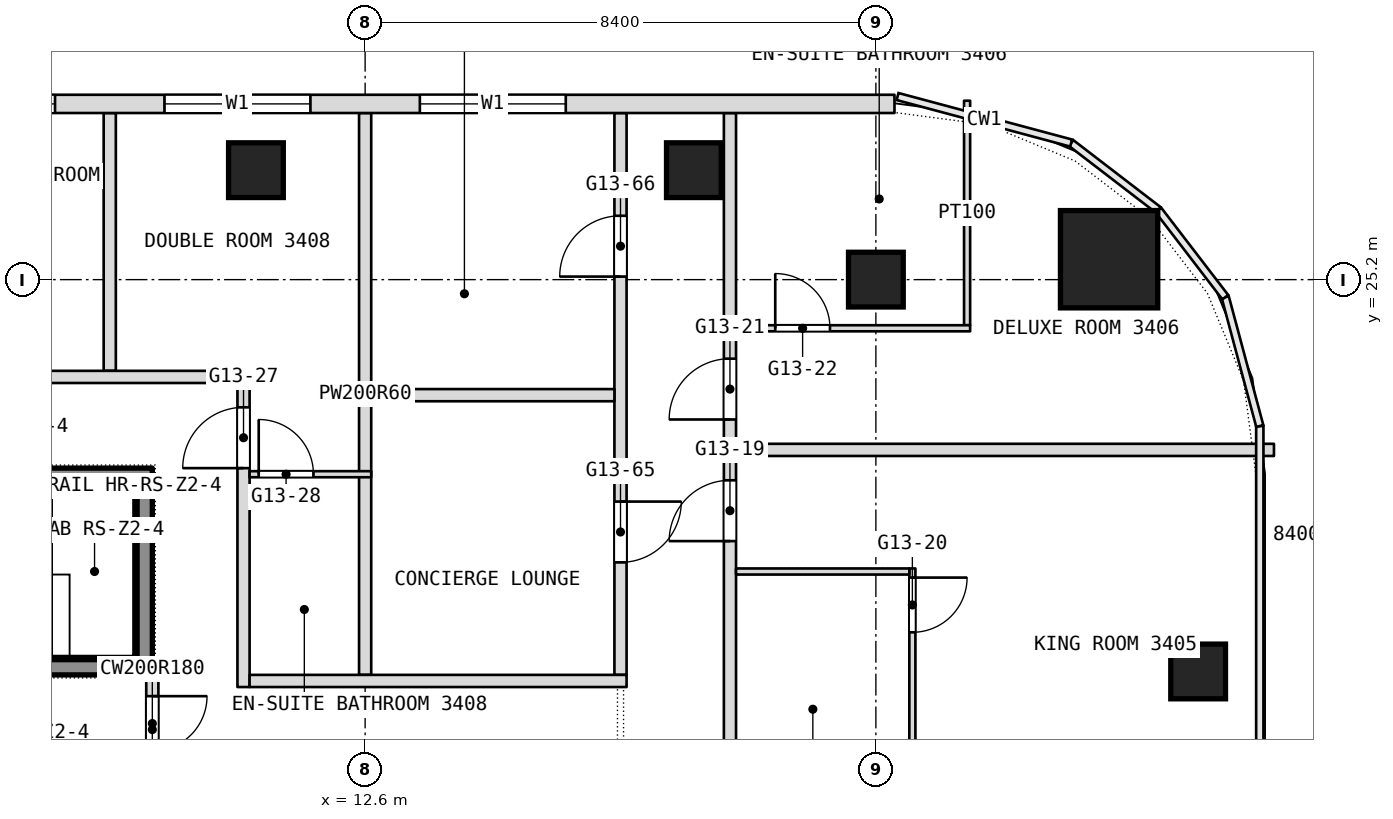
"""IFC4 building model, lengths in metres.
Left out: names, types, materials, properties, quantities, classifications, styles, units other than length and angle.
Written with IfcOpenShell. Run it as: python <this file> out.ifc"""

import sys

from ifc_helpers import new_model, si_unit, direction, frame, frame_2d, origin, origin_2d, place, context, subcontext, project, spatial, rectangle, extrude, element, fill, save


model = new_model("IFC4")
c1 = context("Model", 3, precision=1e-05, world=origin(), true_north=direction((0.0, 1.0)))
c2 = subcontext(c1, "Body", "Model", "MODEL_VIEW")
j1 = project(units=[si_unit("LENGTHUNIT", "METRE"), si_unit("PLANEANGLEUNIT", "RADIAN")], contexts=[c1])
p1 = place(None, origin())
s1 = spatial("IfcSite", under=j1, at=p1, CompositionType="ELEMENT")
p2 = place(p1, origin())
s2 = spatial("IfcBuilding", under=s1, at=p2, CompositionType="ELEMENT")
p3 = place(p2, frame((0.0, 0.0, 148.1)))
s3 = spatial("IfcBuildingStorey", under=s2, at=p3, CompositionType="ELEMENT", Elevation=148.1)
p4 = place(p3, frame((24.835, 25.535, 0.0), z_axis=(0.0, 0.0, 1.0), x_axis=(1.0, 0.0, 0.0)))
e1 = element("IfcColumn", 1, at=p4, inside=s3, PredefinedType="COLUMN", context=c2, shape_type="SweptSolid", body=[
    extrude(rectangle(XDim=1.6, YDim=1.6, at=origin_2d()), origin(), (0.0, 0.0, 1.0), 3.6),
])
for number, where, z_axis, x_axis in (
    (2, (21.0, 25.2, 0.0), (0.0, 0.0, 1.0), (1.0, 0.0, 0.0)),
    (3, (10.804, 27.0, 0.0), (0.0, 0.0, 1.0), (1.0, 0.0, 0.0)),
    (4, (18.007, 27.0, 0.0), (0.0, 0.0, 1.0), (1.0, 0.0, 0.0)),
    (5, (26.3, 18.756, 0.0), (0.0, 0.0, 1.0), (1.0, 0.0, 0.0)),
):
    element("IfcColumn", number, at=place(p3, frame(where, z_axis=z_axis, x_axis=x_axis)), inside=s3, PredefinedType="COLUMN", context=c2, shape_type="SweptSolid", body=[
        extrude(rectangle(XDim=0.9, YDim=0.9, at=origin_2d()), origin(), (0.0, 0.0, 1.0), 3.6),
    ])
p5 = place(p3, frame((22.5, 24.45, 0.0), z_axis=(0.0, 0.0, 1.0), x_axis=(0.0, 1.0, 0.0)))
e6 = element("IfcWall", 6, at=p5, inside=s3, PredefinedType="PARTITIONING", context=c2, shape_type="SweptSolid", body=[
    extrude(rectangle(XDim=3.692, YDim=0.1, at=frame_2d((1.846, 0.0))), origin(), (0.0, 0.0, 1.0), 3.34),
])
p6 = place(p3, frame((21.6, 16.9, 0.0), z_axis=(0.0, 0.0, 1.0), x_axis=(0.0, 1.0, 0.0)))
e7 = element("IfcWall", 7, at=p6, inside=s3, PredefinedType="PARTITIONING", context=c2, shape_type="SweptSolid", body=[
    extrude(rectangle(XDim=3.55, YDim=0.1, at=frame_2d((1.775, 0.0))), origin(), (0.0, 0.0, 1.0), 3.34),
])
p7 = place(p6, frame((2.5, 0.0, 0.0)))
e8 = element("IfcOpeningElement", 8, at=p7, cuts=e7, PredefinedType="OPENING", context=c2, shape_type="SweptSolid", body=[
    extrude(rectangle(XDim=0.9, YDim=2.1, at=frame_2d((0.45, 1.05))), frame((0.0, 0.05, 0.0), z_axis=(0.0, -1.0, 0.0), x_axis=(1.0, 0.0, 0.0)), (0.0, 0.0, 1.0), 0.1),
])
p8 = place(p3, frame((18.6, -21.708, 0.0), z_axis=(0.0, 0.0, 1.0), x_axis=(0.0, 1.0, 0.0)))
e9 = element("IfcWall", 9, at=p8, inside=s3, PredefinedType="PARTITIONING", context=c2, shape_type="SweptSolid", body=[
    extrude(rectangle(XDim=49.648, YDim=0.2, at=frame_2d((24.824, 0.0))), origin(), (0.0, 0.0, 1.0), 3.34),
])
p9 = place(p8, frame((2.8, 0.0, 0.0)))
e10 = element("IfcOpeningElement", 10, at=p9, cuts=e9, PredefinedType="OPENING", context=c2, shape_type="SweptSolid", body=[
    extrude(rectangle(XDim=1.0, YDim=2.1, at=frame_2d((0.5, 1.05))), frame((0.0, 0.1, 0.0), z_axis=(0.0, -1.0, 0.0), x_axis=(1.0, 0.0, 0.0)), (0.0, 0.0, 1.0), 0.2),
])
p10 = place(p8, frame((10.658, 0.0, 0.0)))
e11 = element("IfcOpeningElement", 11, at=p10, cuts=e9, PredefinedType="OPENING", context=c2, shape_type="SweptSolid", body=[
    extrude(rectangle(XDim=1.1, YDim=2.1, at=frame_2d((0.55, 1.05))), frame((0.0, 0.1, 0.0), z_axis=(0.0, -1.0, 0.0), x_axis=(1.0, 0.0, 0.0)), (0.0, 0.0, 1.0), 0.2),
])
p11 = place(p8, frame((16.608, 0.0, 0.0)))
e12 = element("IfcOpeningElement", 12, at=p11, cuts=e9, PredefinedType="OPENING", context=c2, shape_type="SweptSolid", body=[
    extrude(rectangle(XDim=1.8, YDim=2.1, at=frame_2d((0.9, 1.05))), frame((0.0, 0.1, 0.0), z_axis=(0.0, -1.0, 0.0), x_axis=(1.0, 0.0, 0.0)), (0.0, 0.0, 1.0), 0.2),
])
p12 = place(p8, frame((24.508, 0.0, 0.0)))
e13 = element("IfcOpeningElement", 13, at=p12, cuts=e9, PredefinedType="OPENING", context=c2, shape_type="SweptSolid", body=[
    extrude(rectangle(XDim=1.0, YDim=2.1, at=frame_2d((0.5, 1.05))), frame((0.0, 0.1, 0.0), z_axis=(0.0, -1.0, 0.0), x_axis=(1.0, 0.0, 0.0)), (0.0, 0.0, 1.0), 0.2),
])
p13 = place(p8, frame((26.308, 0.0, 0.0)))
e14 = element("IfcOpeningElement", 14, at=p13, cuts=e9, PredefinedType="OPENING", context=c2, shape_type="SweptSolid", body=[
    extrude(rectangle(XDim=1.0, YDim=2.1, at=frame_2d((0.5, 1.05))), frame((0.0, 0.1, 0.0), z_axis=(0.0, -1.0, 0.0), x_axis=(1.0, 0.0, 0.0)), (0.0, 0.0, 1.0), 0.2),
])
p14 = place(p8, frame((33.408, 0.0, 0.0)))
e15 = element("IfcOpeningElement", 15, at=p14, cuts=e9, PredefinedType="OPENING", context=c2, shape_type="SweptSolid", body=[
    extrude(rectangle(XDim=1.8, YDim=2.1, at=frame_2d((0.9, 1.05))), frame((0.0, 0.1, 0.0), z_axis=(0.0, -1.0, 0.0), x_axis=(1.0, 0.0, 0.0)), (0.0, 0.0, 1.0), 0.2),
])
p15 = place(p8, frame((42.608, 0.0, 0.0)))
e16 = element("IfcOpeningElement", 16, at=p15, cuts=e9, PredefinedType="OPENING", context=c2, shape_type="SweptSolid", body=[
    extrude(rectangle(XDim=1.0, YDim=2.1, at=frame_2d((0.5, 1.05))), frame((0.0, 0.1, 0.0), z_axis=(0.0, -1.0, 0.0), x_axis=(1.0, 0.0, 0.0)), (0.0, 0.0, 1.0), 0.2),
])
p16 = place(p8, frame((44.608, 0.0, 0.0)))
e17 = element("IfcOpeningElement", 17, at=p16, cuts=e9, PredefinedType="OPENING", context=c2, shape_type="SweptSolid", body=[
    extrude(rectangle(XDim=1.0, YDim=2.1, at=frame_2d((0.5, 1.05))), frame((0.0, 0.1, 0.0), z_axis=(0.0, -1.0, 0.0), x_axis=(1.0, 0.0, 0.0)), (0.0, 0.0, 1.0), 0.2),
])
p17 = place(p3, frame((16.8, 18.7, 0.0), z_axis=(0.0, 0.0, 1.0), x_axis=(0.0, 1.0, 0.0)))
e18 = element("IfcWall", 18, at=p17, inside=s3, PredefinedType="PARTITIONING", context=c2, shape_type="SweptSolid", body=[
    extrude(rectangle(XDim=9.24, YDim=0.2, at=frame_2d((4.62, 0.0))), origin(), (0.0, 0.0, 1.0), 3.34),
])
p18 = place(p17, frame((1.85, 0.0, 0.0)))
e19 = element("IfcOpeningElement", 19, at=p18, cuts=e18, PredefinedType="OPENING", context=c2, shape_type="SweptSolid", body=[
    extrude(rectangle(XDim=1.0, YDim=2.1, at=frame_2d((0.5, 1.05))), frame((0.0, 0.1, 0.0), z_axis=(0.0, -1.0, 0.0), x_axis=(1.0, 0.0, 0.0)), (0.0, 0.0, 1.0), 0.2),
])
p19 = place(p17, frame((6.55, 0.0, 0.0)))
e20 = element("IfcOpeningElement", 20, at=p19, cuts=e18, PredefinedType="OPENING", context=c2, shape_type="SweptSolid", body=[
    extrude(rectangle(XDim=1.0, YDim=2.1, at=frame_2d((0.5, 1.05))), frame((0.0, 0.1, 0.0), z_axis=(0.0, -1.0, 0.0), x_axis=(1.0, 0.0, 0.0)), (0.0, 0.0, 1.0), 0.2),
])
p20 = place(p3, frame((12.6, 18.7, 0.0), z_axis=(0.0, 0.0, 1.0), x_axis=(0.0, 1.0, 0.0)))
e21 = element("IfcWall", 21, at=p20, inside=s3, PredefinedType="PARTITIONING", context=c2, shape_type="SweptSolid", body=[
    extrude(rectangle(XDim=9.24, YDim=0.2, at=frame_2d((4.62, 0.0))), origin(), (0.0, 0.0, 1.0), 3.34),
])
p21 = place(p3, frame((10.6, 18.5, 0.0), z_axis=(0.0, 0.0, 1.0), x_axis=(0.0, 1.0, 0.0)))
e22 = element("IfcWall", 22, at=p21, inside=s3, PredefinedType="PARTITIONING", context=c2, shape_type="SweptSolid", body=[
    extrude(rectangle(XDim=5.0, YDim=0.2, at=frame_2d((2.5, 0.0))), origin(), (0.0, 0.0, 1.0), 3.34),
])
p22 = place(p21, frame((3.6, 0.0, 0.0)))
e23 = element("IfcOpeningElement", 23, at=p22, cuts=e22, PredefinedType="OPENING", context=c2, shape_type="SweptSolid", body=[
    extrude(rectangle(XDim=1.0, YDim=2.1, at=frame_2d((0.5, 1.05))), frame((0.0, 0.1, 0.0), z_axis=(0.0, -1.0, 0.0), x_axis=(1.0, 0.0, 0.0)), (0.0, 0.0, 1.0), 0.2),
])
p23 = place(p3, frame((9.1, 16.9, 0.0), z_axis=(0.0, 0.0, 1.0), x_axis=(0.0, 1.0, 0.0)))
e24 = element("IfcWall", 24, at=p23, inside=s3, PredefinedType="PARTITIONING", context=c2, shape_type="SweptSolid", body=[
    extrude(rectangle(XDim=1.8, YDim=0.2, at=frame_2d((0.9, 0.0))), origin(), (0.0, 0.0, 1.0), 3.34),
])
p24 = place(p23, frame((0.55, 0.0, 0.0)))
e25 = element("IfcOpeningElement", 25, at=p24, cuts=e24, PredefinedType="OPENING", context=c2, shape_type="SweptSolid", body=[
    extrude(rectangle(XDim=0.9, YDim=2.1, at=frame_2d((0.45, 1.05))), frame((0.0, 0.1, 0.0), z_axis=(0.0, -1.0, 0.0), x_axis=(1.0, 0.0, 0.0)), (0.0, 0.0, 1.0), 0.2),
])
p25 = place(p3, frame((8.4, 23.7, 0.0), z_axis=(0.0, 0.0, 1.0), x_axis=(0.0, 1.0, 0.0)))
e26 = element("IfcWall", 26, at=p25, inside=s3, PredefinedType="PARTITIONING", context=c2, shape_type="SweptSolid", body=[
    extrude(rectangle(XDim=4.24, YDim=0.2, at=frame_2d((2.12, 0.0))), origin(), (0.0, 0.0, 1.0), 3.34),
])
p26 = place(p3, frame((10.7, 18.6, 0.0), z_axis=(0.0, 0.0, 1.0), x_axis=(1.0, 0.0, 0.0)))
e27 = element("IfcWall", 27, at=p26, inside=s3, PredefinedType="PARTITIONING", context=c2, shape_type="SweptSolid", body=[
    extrude(rectangle(XDim=6.2, YDim=0.2, at=frame_2d((3.1, 0.0))), origin(), (0.0, 0.0, 1.0), 3.34),
])
p27 = place(p3, frame((18.7, 20.4, 0.0), z_axis=(0.0, 0.0, 1.0), x_axis=(1.0, 0.0, 0.0)))
e28 = element("IfcWall", 28, at=p27, inside=s3, PredefinedType="PARTITIONING", context=c2, shape_type="SweptSolid", body=[
    extrude(rectangle(XDim=2.85, YDim=0.1, at=frame_2d((1.425, 0.0))), origin(), (0.0, 0.0, 1.0), 3.34),
])
p28 = place(p3, frame((10.7, 22.0, 0.0), z_axis=(0.0, 0.0, 1.0), x_axis=(1.0, 0.0, 0.0)))
e29 = element("IfcWall", 29, at=p28, inside=s3, PredefinedType="PARTITIONING", context=c2, shape_type="SweptSolid", body=[
    extrude(rectangle(XDim=2.0, YDim=0.1, at=frame_2d((1.0, 0.0))), origin(), (0.0, 0.0, 1.0), 3.34),
])
p29 = place(p28, frame((0.15, 0.0, 0.0)))
e30 = element("IfcOpeningElement", 30, at=p29, cuts=e29, PredefinedType="OPENING", context=c2, shape_type="SweptSolid", body=[
    extrude(rectangle(XDim=0.9, YDim=2.1, at=frame_2d((0.45, 1.05))), frame((0.0, 0.05, 0.0), z_axis=(0.0, -1.0, 0.0), x_axis=(1.0, 0.0, 0.0)), (0.0, 0.0, 1.0), 0.1),
])
p30 = place(p3, frame((18.7, 22.4, 0.0), z_axis=(0.0, 0.0, 1.0), x_axis=(1.0, 0.0, 0.0)))
e31 = element("IfcWall", 31, at=p30, inside=s3, PredefinedType="PARTITIONING", context=c2, shape_type="SweptSolid", body=[
    extrude(rectangle(XDim=8.847, YDim=0.2, at=frame_2d((4.424, 0.0))), origin(), (0.0, 0.0, 1.0), 3.34),
])
p31 = place(p3, frame((12.7, 23.3, 0.0), z_axis=(0.0, 0.0, 1.0), x_axis=(1.0, 0.0, 0.0)))
e32 = element("IfcWall", 32, at=p31, inside=s3, PredefinedType="PARTITIONING", context=c2, shape_type="SweptSolid", body=[
    extrude(rectangle(XDim=4.0, YDim=0.2, at=frame_2d((2.0, 0.0))), origin(), (0.0, 0.0, 1.0), 3.34),
])
p32 = place(p3, frame((1.5, 23.6, 0.0), z_axis=(0.0, 0.0, 1.0), x_axis=(1.0, 0.0, 0.0)))
e33 = element("IfcWall", 33, at=p32, inside=s3, PredefinedType="PARTITIONING", context=c2, shape_type="SweptSolid", body=[
    extrude(rectangle(XDim=9.2, YDim=0.2, at=frame_2d((4.6, 0.0))), origin(), (0.0, 0.0, 1.0), 3.34),
])
p33 = place(p32, frame((4.3, 0.0, 0.0)))
e34 = element("IfcOpeningElement", 34, at=p33, cuts=e33, PredefinedType="OPENING", context=c2, shape_type="SweptSolid", body=[
    extrude(rectangle(XDim=1.0, YDim=2.1, at=frame_2d((0.5, 1.05))), frame((0.0, 0.1, 0.0), z_axis=(0.0, -1.0, 0.0), x_axis=(1.0, 0.0, 0.0)), (0.0, 0.0, 1.0), 0.2),
])
p34 = place(p3, frame((18.7, 24.4, 0.0), z_axis=(0.0, 0.0, 1.0), x_axis=(1.0, 0.0, 0.0)))
e35 = element("IfcWall", 35, at=p34, inside=s3, PredefinedType="PARTITIONING", context=c2, shape_type="SweptSolid", body=[
    extrude(rectangle(XDim=3.85, YDim=0.1, at=frame_2d((1.925, 0.0))), origin(), (0.0, 0.0, 1.0), 3.34),
])
p35 = place(p34, frame((0.645, 0.0, 0.0)))
e36 = element("IfcOpeningElement", 36, at=p35, cuts=e35, PredefinedType="OPENING", context=c2, shape_type="SweptSolid", body=[
    extrude(rectangle(XDim=0.9, YDim=2.1, at=frame_2d((0.45, 1.05))), frame((0.0, 0.05, 0.0), z_axis=(0.0, -1.0, 0.0), x_axis=(1.0, 0.0, 0.0)), (0.0, 0.0, 1.0), 0.1),
])
p36 = place(p3, frame((21.306, 28.09, 0.0), z_axis=(0.0, 0.0, 1.0), x_axis=(-1.0, 0.0, 0.0)))
e37 = element("IfcWall", 37, at=p36, inside=s3, PredefinedType="NOTDEFINED", context=c2, shape_type="SweptSolid", body=[
    extrude(rectangle(XDim=42.612, YDim=0.3, at=frame_2d((21.306, 0.0))), origin(), (0.0, 0.0, 1.0), 3.6),
])
p37 = place(p36, frame((5.406, 0.0, 0.9)))
e38 = element("IfcOpeningElement", 38, at=p37, cuts=e37, PredefinedType="OPENING", context=c2, shape_type="SweptSolid", body=[
    extrude(rectangle(XDim=2.4, YDim=2.1, at=frame_2d((1.2, 1.05))), frame((0.0, 0.15, 0.0), z_axis=(0.0, -1.0, 0.0), x_axis=(1.0, 0.0, 0.0)), (0.0, 0.0, 1.0), 0.3),
])
p38 = place(p36, frame((9.606, 0.0, 0.9)))
e39 = element("IfcOpeningElement", 39, at=p38, cuts=e37, PredefinedType="OPENING", context=c2, shape_type="SweptSolid", body=[
    extrude(rectangle(XDim=2.4, YDim=2.1, at=frame_2d((1.2, 1.05))), frame((0.0, 0.15, 0.0), z_axis=(0.0, -1.0, 0.0), x_axis=(1.0, 0.0, 0.0)), (0.0, 0.0, 1.0), 0.3),
])
p39 = place(p36, frame((13.806, 0.0, 0.9)))
e40 = element("IfcOpeningElement", 40, at=p39, cuts=e37, PredefinedType="OPENING", context=c2, shape_type="SweptSolid", body=[
    extrude(rectangle(XDim=2.4, YDim=2.1, at=frame_2d((1.2, 1.05))), frame((0.0, 0.15, 0.0), z_axis=(0.0, -1.0, 0.0), x_axis=(1.0, 0.0, 0.0)), (0.0, 0.0, 1.0), 0.3),
])
p40 = place(p36, frame((18.006, 0.0, 0.9)))
e41 = element("IfcOpeningElement", 41, at=p40, cuts=e37, PredefinedType="OPENING", context=c2, shape_type="SweptSolid", body=[
    extrude(rectangle(XDim=2.4, YDim=2.1, at=frame_2d((1.2, 1.05))), frame((0.0, 0.15, 0.0), z_axis=(0.0, -1.0, 0.0), x_axis=(1.0, 0.0, 0.0)), (0.0, 0.0, 1.0), 0.3),
])
p41 = place(p36, frame((22.206, 0.0, 0.9)))
e42 = element("IfcOpeningElement", 42, at=p41, cuts=e37, PredefinedType="OPENING", context=c2, shape_type="SweptSolid", body=[
    extrude(rectangle(XDim=2.4, YDim=2.1, at=frame_2d((1.2, 1.05))), frame((0.0, 0.15, 0.0), z_axis=(0.0, -1.0, 0.0), x_axis=(1.0, 0.0, 0.0)), (0.0, 0.0, 1.0), 0.3),
])
p42 = place(p36, frame((26.406, 0.0, 0.9)))
e43 = element("IfcOpeningElement", 43, at=p42, cuts=e37, PredefinedType="OPENING", context=c2, shape_type="SweptSolid", body=[
    extrude(rectangle(XDim=2.4, YDim=2.1, at=frame_2d((1.2, 1.05))), frame((0.0, 0.15, 0.0), z_axis=(0.0, -1.0, 0.0), x_axis=(1.0, 0.0, 0.0)), (0.0, 0.0, 1.0), 0.3),
])
p43 = place(p36, frame((30.606, 0.0, 0.9)))
e44 = element("IfcOpeningElement", 44, at=p43, cuts=e37, PredefinedType="OPENING", context=c2, shape_type="SweptSolid", body=[
    extrude(rectangle(XDim=2.4, YDim=2.1, at=frame_2d((1.2, 1.05))), frame((0.0, 0.15, 0.0), z_axis=(0.0, -1.0, 0.0), x_axis=(1.0, 0.0, 0.0)), (0.0, 0.0, 1.0), 0.3),
])
p44 = place(p36, frame((34.806, 0.0, 0.9)))
e45 = element("IfcOpeningElement", 45, at=p44, cuts=e37, PredefinedType="OPENING", context=c2, shape_type="SweptSolid", body=[
    extrude(rectangle(XDim=2.4, YDim=2.1, at=frame_2d((1.2, 1.05))), frame((0.0, 0.15, 0.0), z_axis=(0.0, -1.0, 0.0), x_axis=(1.0, 0.0, 0.0)), (0.0, 0.0, 1.0), 0.3),
])
p45 = place(p3, frame((2.9, 18.825, 0.1), z_axis=(0.0, 0.0, 1.0), x_axis=(1.0, 0.0, 0.0)))
e46 = element("IfcWall", 46, at=p45, inside=s3, PredefinedType="SHEAR", context=c2, shape_type="SweptSolid", body=[
    extrude(rectangle(XDim=6.2, YDim=0.25, at=frame_2d((3.1, 0.0))), origin(), (0.0, 0.0, 1.0), 3.6),
])
p46 = place(p45, frame((0.45, 0.0, 0.0)))
e47 = element("IfcOpeningElement", 47, at=p46, cuts=e46, PredefinedType="OPENING", context=c2, shape_type="SweptSolid", body=[
    extrude(rectangle(XDim=1.0, YDim=2.1, at=frame_2d((0.5, 1.05))), frame((0.0, 0.125, 0.0), z_axis=(0.0, -1.0, 0.0), x_axis=(1.0, 0.0, 0.0)), (0.0, 0.0, 1.0), 0.25),
])
p47 = place(p3, frame((2.9, 21.975, 0.1), z_axis=(0.0, 0.0, 1.0), x_axis=(1.0, 0.0, 0.0)))
e48 = element("IfcWall", 48, at=p47, inside=s3, PredefinedType="SHEAR", context=c2, shape_type="SweptSolid", body=[
    extrude(rectangle(XDim=6.2, YDim=0.25, at=frame_2d((3.1, 0.0))), origin(), (0.0, 0.0, 1.0), 3.6),
])
p48 = place(p3, frame((8.975, 18.95, 0.1), z_axis=(0.0, 0.0, 1.0), x_axis=(0.0, 1.0, 0.0)))
e49 = element("IfcWall", 49, at=p48, inside=s3, PredefinedType="SHEAR", context=c2, shape_type="SweptSolid", body=[
    extrude(rectangle(XDim=2.9, YDim=0.25, at=frame_2d((1.45, 0.0))), origin(), (0.0, 0.0, 1.0), 3.6),
])
p49 = place(p7, origin())
e50 = element("IfcDoor", 50, at=p49, inside=s3, OperationType="SINGLE_SWING_RIGHT", PredefinedType="DOOR", context=c2, shape_type="SweptSolid", body=[
    extrude(rectangle(XDim=0.9, YDim=2.1, at=frame_2d((0.45, 1.05))), frame((0.0, 0.025, 0.0), z_axis=(0.0, -1.0, 0.0), x_axis=(1.0, 0.0, 0.0)), (0.0, 0.0, 1.0), 0.05),
])
fill(e8, e50)
p50 = place(p15, origin())
e51 = element("IfcDoor", 51, at=p50, inside=s3, OperationType="SINGLE_SWING_LEFT", PredefinedType="DOOR", context=c2, shape_type="SweptSolid", body=[
    extrude(rectangle(XDim=1.0, YDim=2.1, at=frame_2d((0.5, 1.05))), frame((0.0, 0.025, 0.0), z_axis=(0.0, -1.0, 0.0), x_axis=(1.0, 0.0, 0.0)), (0.0, 0.0, 1.0), 0.05),
])
fill(e16, e51)
p51 = place(p16, origin())
e52 = element("IfcDoor", 52, at=p51, inside=s3, OperationType="SINGLE_SWING_LEFT", PredefinedType="DOOR", context=c2, shape_type="SweptSolid", body=[
    extrude(rectangle(XDim=1.0, YDim=2.1, at=frame_2d((0.5, 1.05))), frame((0.0, 0.025, 0.0), z_axis=(0.0, -1.0, 0.0), x_axis=(1.0, 0.0, 0.0)), (0.0, 0.0, 1.0), 0.05),
])
fill(e17, e52)
p52 = place(p18, origin())
e53 = element("IfcDoor", 53, at=p52, inside=s3, OperationType="SINGLE_SWING_LEFT", PredefinedType="DOOR", context=c2, shape_type="SweptSolid", body=[
    extrude(rectangle(XDim=1.0, YDim=2.1, at=frame_2d((0.5, 1.05))), frame((0.0, 0.025, 0.0), z_axis=(0.0, -1.0, 0.0), x_axis=(1.0, 0.0, 0.0)), (0.0, 0.0, 1.0), 0.05),
])
fill(e19, e53)
p53 = place(p19, origin())
e54 = element("IfcDoor", 54, at=p53, inside=s3, OperationType="SINGLE_SWING_LEFT", PredefinedType="DOOR", context=c2, shape_type="SweptSolid", body=[
    extrude(rectangle(XDim=1.0, YDim=2.1, at=frame_2d((0.5, 1.05))), frame((0.0, 0.025, 0.0), z_axis=(0.0, -1.0, 0.0), x_axis=(1.0, 0.0, 0.0)), (0.0, 0.0, 1.0), 0.05),
])
fill(e20, e54)
p54 = place(p22, origin())
e55 = element("IfcDoor", 55, at=p54, inside=s3, OperationType="SINGLE_SWING_LEFT", PredefinedType="DOOR", context=c2, shape_type="SweptSolid", body=[
    extrude(rectangle(XDim=1.0, YDim=2.1, at=frame_2d((0.5, 1.05))), frame((0.0, 0.025, 0.0), z_axis=(0.0, -1.0, 0.0), x_axis=(1.0, 0.0, 0.0)), (0.0, 0.0, 1.0), 0.05),
])
fill(e23, e55)
p55 = place(p24, origin())
e56 = element("IfcDoor", 56, at=p55, inside=s3, OperationType="SINGLE_SWING_RIGHT", PredefinedType="DOOR", context=c2, shape_type="SweptSolid", body=[
    extrude(rectangle(XDim=0.9, YDim=2.1, at=frame_2d((0.45, 1.05))), frame((0.0, 0.025, 0.0), z_axis=(0.0, -1.0, 0.0), x_axis=(1.0, 0.0, 0.0)), (0.0, 0.0, 1.0), 0.05),
])
fill(e25, e56)
p56 = place(p29, origin())
e57 = element("IfcDoor", 57, at=p56, inside=s3, OperationType="SINGLE_SWING_RIGHT", PredefinedType="DOOR", context=c2, shape_type="SweptSolid", body=[
    extrude(rectangle(XDim=0.9, YDim=2.1, at=frame_2d((0.45, 1.05))), frame((0.0, 0.025, 0.0), z_axis=(0.0, -1.0, 0.0), x_axis=(1.0, 0.0, 0.0)), (0.0, 0.0, 1.0), 0.05),
])
fill(e30, e57)
p57 = place(p35, origin())
e58 = element("IfcDoor", 58, at=p57, inside=s3, OperationType="SINGLE_SWING_RIGHT", PredefinedType="DOOR", context=c2, shape_type="SweptSolid", body=[
    extrude(rectangle(XDim=0.9, YDim=2.1, at=frame_2d((0.45, 1.05))), frame((0.0, 0.025, 0.0), z_axis=(0.0, -1.0, 0.0), x_axis=(1.0, 0.0, 0.0)), (0.0, 0.0, 1.0), 0.05),
])
fill(e36, e58)
p58 = place(p37, origin())
e59 = element("IfcWindow", 59, at=p58, inside=s3, PartitioningType="SINGLE_PANEL", PredefinedType="WINDOW", context=c2, shape_type="SweptSolid", body=[
    extrude(rectangle(XDim=2.4, YDim=2.1, at=frame_2d((1.2, 1.05))), frame((0.0, 0.03, 0.0), z_axis=(0.0, -1.0, 0.0), x_axis=(1.0, 0.0, 0.0)), (0.0, 0.0, 1.0), 0.06),
])
fill(e38, e59)
p59 = place(p38, origin())
e60 = element("IfcWindow", 60, at=p59, inside=s3, PartitioningType="SINGLE_PANEL", PredefinedType="WINDOW", context=c2, shape_type="SweptSolid", body=[
    extrude(rectangle(XDim=2.4, YDim=2.1, at=frame_2d((1.2, 1.05))), frame((0.0, 0.03, 0.0), z_axis=(0.0, -1.0, 0.0), x_axis=(1.0, 0.0, 0.0)), (0.0, 0.0, 1.0), 0.06),
])
fill(e39, e60)
p60 = place(p39, origin())
e61 = element("IfcWindow", 61, at=p60, inside=s3, PartitioningType="SINGLE_PANEL", PredefinedType="WINDOW", context=c2, shape_type="SweptSolid", body=[
    extrude(rectangle(XDim=2.4, YDim=2.1, at=frame_2d((1.2, 1.05))), frame((0.0, 0.03, 0.0), z_axis=(0.0, -1.0, 0.0), x_axis=(1.0, 0.0, 0.0)), (0.0, 0.0, 1.0), 0.06),
])
fill(e40, e61)
save(model, sys.argv[1])
